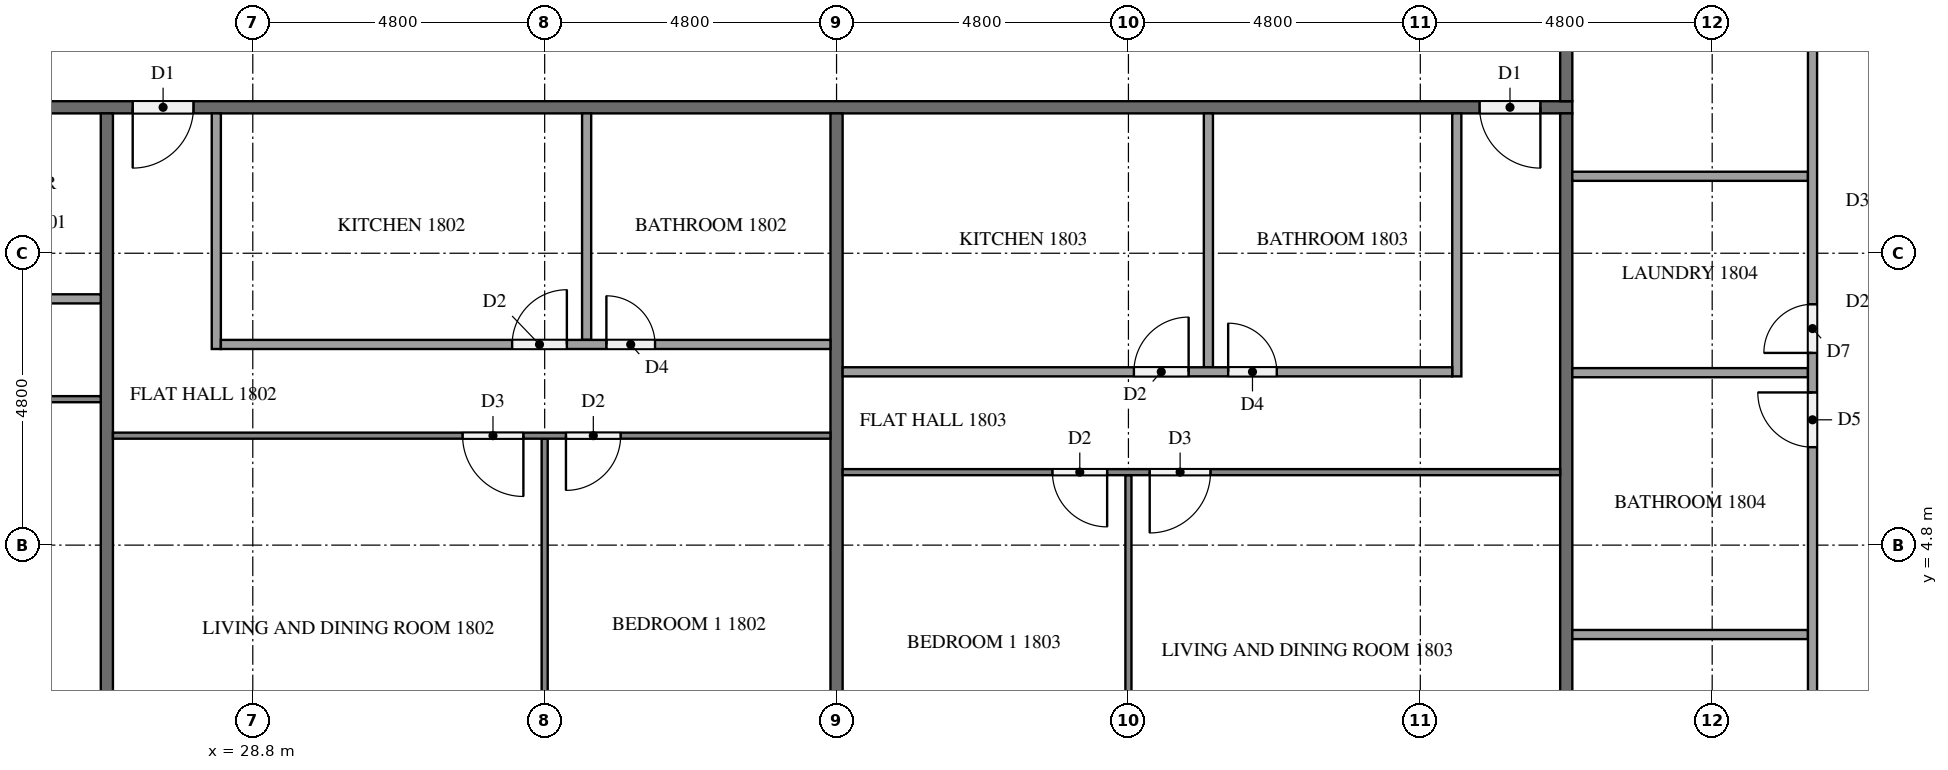
"""IFC4 building model, lengths in metres.
Left out: names, types, materials, properties, quantities, classifications, styles, units other than length and angle.
Written with IfcOpenShell. Run it as: python <this file> out.ifc"""

import sys

from ifc_helpers import new_model, si_unit, direction, frame, frame_2d, origin, place, context, subcontext, project, spatial, rectangle, extrude, element, fill, save


model = new_model("IFC4")
c1 = context("Model", 3, precision=1e-05, world=origin(), true_north=direction((0.0, 1.0)))
c2 = subcontext(c1, "Body", "Model", "MODEL_VIEW")
j1 = project(units=[si_unit("LENGTHUNIT", "METRE"), si_unit("PLANEANGLEUNIT", "RADIAN")], contexts=[c1])
p1 = place(None, origin())
s1 = spatial("IfcSite", under=j1, at=p1, CompositionType="ELEMENT")
p2 = place(p1, origin())
s2 = spatial("IfcBuilding", under=s1, at=p2, CompositionType="ELEMENT")
p3 = place(p2, frame((0.0, 0.0, 73.3)))
s3 = spatial("IfcBuildingStorey", under=s2, at=p3, CompositionType="ELEMENT", Elevation=73.3)
p4 = place(p3, frame((50.5, 12.0, 0.0), z_axis=(0.0, 0.0, 1.0), x_axis=(-1.0, 0.0, 0.0)))
e1 = element("IfcWall", 1, at=p4, inside=s3, PredefinedType="PARTITIONING", context=c2, shape_type="SweptSolid", body=[
    extrude(rectangle(XDim=38.6, YDim=0.2, at=frame_2d((19.3, 0.0))), origin(), (0.0, 0.0, 1.0), 3.2),
])
p5 = place(p4, frame((37.075, 0.0, 0.0)))
e2 = element("IfcOpeningElement", 2, at=p5, cuts=e1, PredefinedType="OPENING", context=c2, shape_type="SweptSolid", body=[
    extrude(rectangle(XDim=1.0, YDim=2.1, at=frame_2d((0.5, 1.05))), frame((0.0, 0.11, 0.0), z_axis=(0.0, -1.0, 0.0), x_axis=(1.0, 0.0, 0.0)), (0.0, 0.0, 1.0), 0.22),
])
p6 = place(p4, frame((22.675, 0.0, 0.0)))
e3 = element("IfcOpeningElement", 3, at=p6, cuts=e1, PredefinedType="OPENING", context=c2, shape_type="SweptSolid", body=[
    extrude(rectangle(XDim=1.0, YDim=2.1, at=frame_2d((0.5, 1.05))), frame((0.0, 0.11, 0.0), z_axis=(0.0, -1.0, 0.0), x_axis=(1.0, 0.0, 0.0)), (0.0, 0.0, 1.0), 0.22),
])
p7 = place(p4, frame((0.525, 0.0, 0.0)))
e4 = element("IfcOpeningElement", 4, at=p7, cuts=e1, PredefinedType="OPENING", context=c2, shape_type="SweptSolid", body=[
    extrude(rectangle(XDim=1.0, YDim=2.1, at=frame_2d((0.5, 1.05))), frame((0.0, 0.11, 0.0), z_axis=(0.0, -1.0, 0.0), x_axis=(1.0, 0.0, 0.0)), (0.0, 0.0, 1.0), 0.22),
])
p8 = place(p3, frame((50.4, 40.7, 0.0), z_axis=(0.0, 0.0, 1.0), x_axis=(0.0, -1.0, 0.0)))
e5 = element("IfcWall", 5, at=p8, inside=s3, PredefinedType="PARTITIONING", context=c2, shape_type="SweptSolid", body=[
    extrude(rectangle(XDim=28.6, YDim=0.2, at=frame_2d((14.3, 0.0))), origin(), (0.0, 0.0, 1.0), 3.2),
])
p9 = place(p8, frame((21.875, 0.0, 0.0)))
e6 = element("IfcOpeningElement", 6, at=p9, cuts=e5, PredefinedType="OPENING", context=c2, shape_type="SweptSolid", body=[
    extrude(rectangle(XDim=1.1, YDim=2.1, at=frame_2d((0.55, 1.05))), frame((0.0, 0.11, 0.0), z_axis=(0.0, -1.0, 0.0), x_axis=(1.0, 0.0, 0.0)), (0.0, 0.0, 1.0), 0.22),
])
p10 = place(p8, frame((20.075, 0.0, 0.0)))
e7 = element("IfcOpeningElement", 7, at=p10, cuts=e5, PredefinedType="OPENING", context=c2, shape_type="SweptSolid", body=[
    extrude(rectangle(XDim=1.0, YDim=2.1, at=frame_2d((0.5, 1.05))), frame((0.0, 0.11, 0.0), z_axis=(0.0, -1.0, 0.0), x_axis=(1.0, 0.0, 0.0)), (0.0, 0.0, 1.0), 0.22),
])
p11 = place(p8, frame((5.675, 0.0, 0.0)))
e8 = element("IfcOpeningElement", 8, at=p11, cuts=e5, PredefinedType="OPENING", context=c2, shape_type="SweptSolid", body=[
    extrude(rectangle(XDim=1.0, YDim=2.1, at=frame_2d((0.5, 1.05))), frame((0.0, 0.11, 0.0), z_axis=(0.0, -1.0, 0.0), x_axis=(1.0, 0.0, 0.0)), (0.0, 0.0, 1.0), 0.22),
])
p12 = place(p3, frame((26.4, 11.9, 0.0), z_axis=(0.0, 0.0, 1.0), x_axis=(0.0, -1.0, 0.0)))
e9 = element("IfcWall", 9, at=p12, inside=s3, PredefinedType="PARTITIONING", context=c2, shape_type="SweptSolid", body=[
    extrude(rectangle(XDim=11.8, YDim=0.2, at=frame_2d((5.9, 0.0))), origin(), (0.0, 0.0, 1.0), 3.2),
])
p13 = place(p3, frame((38.4, 11.9, 0.0), z_axis=(0.0, 0.0, 1.0), x_axis=(0.0, -1.0, 0.0)))
e10 = element("IfcWall", 10, at=p13, inside=s3, PredefinedType="PARTITIONING", context=c2, shape_type="SweptSolid", body=[
    extrude(rectangle(XDim=11.475, YDim=0.2, at=frame_2d((5.737, 0.0))), origin(), (0.0, 0.0, 1.0), 3.2),
])
p14 = place(p3, frame((50.4, 11.9, 0.0), z_axis=(0.0, 0.0, 1.0), x_axis=(0.0, -1.0, 0.0)))
e11 = element("IfcWall", 11, at=p14, inside=s3, PredefinedType="PARTITIONING", context=c2, shape_type="SweptSolid", body=[
    extrude(rectangle(XDim=11.8, YDim=0.2, at=frame_2d((5.9, 0.0))), origin(), (0.0, 0.0, 1.0), 3.2),
])
p15 = place(p3, frame((26.3, 7.2, 0.0), z_axis=(0.0, 0.0, 1.0), x_axis=(-1.0, 0.0, 0.0)))
e12 = element("IfcWall", 12, at=p15, inside=s3, PredefinedType="PARTITIONING", context=c2, shape_type="SweptSolid", body=[
    extrude(rectangle(XDim=14.2, YDim=0.1, at=frame_2d((7.1, 0.0))), origin(), (0.0, 0.0, 1.0), 3.2),
])
p16 = place(p15, frame((12.9, 0.0, 0.0)))
e13 = element("IfcOpeningElement", 13, at=p16, cuts=e12, PredefinedType="OPENING", context=c2, shape_type="SweptSolid", body=[
    extrude(rectangle(XDim=1.0, YDim=2.1, at=frame_2d((0.5, 1.05))), frame((0.0, 0.06, 0.0), z_axis=(0.0, -1.0, 0.0), x_axis=(1.0, 0.0, 0.0)), (0.0, 0.0, 1.0), 0.12),
])
p17 = place(p15, frame((5.05, 0.0, 0.0)))
e14 = element("IfcOpeningElement", 14, at=p17, cuts=e12, PredefinedType="OPENING", context=c2, shape_type="SweptSolid", body=[
    extrude(rectangle(XDim=0.9, YDim=2.1, at=frame_2d((0.45, 1.05))), frame((0.0, 0.06, 0.0), z_axis=(0.0, -1.0, 0.0), x_axis=(1.0, 0.0, 0.0)), (0.0, 0.0, 1.0), 0.12),
])
p18 = place(p15, frame((3.45, 0.0, 0.0)))
e15 = element("IfcOpeningElement", 15, at=p18, cuts=e12, PredefinedType="OPENING", context=c2, shape_type="SweptSolid", body=[
    extrude(rectangle(XDim=0.9, YDim=2.1, at=frame_2d((0.45, 1.05))), frame((0.0, 0.06, 0.0), z_axis=(0.0, -1.0, 0.0), x_axis=(1.0, 0.0, 0.0)), (0.0, 0.0, 1.0), 0.12),
])
p19 = place(p3, frame((13.875, 8.85, 0.0), z_axis=(0.0, 0.0, 1.0), x_axis=(1.0, 0.0, 0.0)))
e16 = element("IfcWall", 16, at=p19, inside=s3, PredefinedType="PARTITIONING", context=c2, shape_type="SweptSolid", body=[
    extrude(rectangle(XDim=12.425, YDim=0.15, at=frame_2d((6.212, 0.0))), origin(), (0.0, 0.0, 1.0), 3.2),
])
p20 = place(p19, frame((0.3, 0.0, 0.0)))
e17 = element("IfcOpeningElement", 17, at=p20, cuts=e16, PredefinedType="OPENING", context=c2, shape_type="SweptSolid", body=[
    extrude(rectangle(XDim=0.9, YDim=2.1, at=frame_2d((0.45, 1.05))), frame((0.0, 0.085, 0.0), z_axis=(0.0, -1.0, 0.0), x_axis=(1.0, 0.0, 0.0)), (0.0, 0.0, 1.0), 0.17),
])
p21 = place(p19, frame((8.333, 0.0, 0.0)))
e18 = element("IfcOpeningElement", 18, at=p21, cuts=e16, PredefinedType="OPENING", context=c2, shape_type="SweptSolid", body=[
    extrude(rectangle(XDim=0.9, YDim=2.1, at=frame_2d((0.45, 1.05))), frame((0.0, 0.085, 0.0), z_axis=(0.0, -1.0, 0.0), x_axis=(1.0, 0.0, 0.0)), (0.0, 0.0, 1.0), 0.17),
])
p22 = place(p19, frame((9.883, 0.0, 0.0)))
e19 = element("IfcOpeningElement", 19, at=p22, cuts=e16, PredefinedType="OPENING", context=c2, shape_type="SweptSolid", body=[
    extrude(rectangle(XDim=0.8, YDim=2.1, at=frame_2d((0.4, 1.05))), frame((0.0, 0.085, 0.0), z_axis=(0.0, -1.0, 0.0), x_axis=(1.0, 0.0, 0.0)), (0.0, 0.0, 1.0), 0.17),
])
p23 = place(p3, frame((33.6, 6.55, 0.0), z_axis=(0.0, 0.0, 1.0), x_axis=(0.0, -1.0, 0.0)))
e20 = element("IfcWall", 20, at=p23, inside=s3, PredefinedType="PARTITIONING", context=c2, shape_type="SweptSolid", body=[
    extrude(rectangle(XDim=6.45, YDim=0.1, at=frame_2d((3.225, 0.0))), origin(), (0.0, 0.0, 1.0), 3.2),
])
p24 = place(p3, frame((38.3, 6.6, 0.0), z_axis=(0.0, 0.0, 1.0), x_axis=(-1.0, 0.0, 0.0)))
e21 = element("IfcWall", 21, at=p24, inside=s3, PredefinedType="PARTITIONING", context=c2, shape_type="SweptSolid", body=[
    extrude(rectangle(XDim=11.8, YDim=0.1, at=frame_2d((5.9, 0.0))), origin(), (0.0, 0.0, 1.0), 3.2),
])
p25 = place(p24, frame((5.05, 0.0, 0.0)))
e22 = element("IfcOpeningElement", 22, at=p25, cuts=e21, PredefinedType="OPENING", context=c2, shape_type="SweptSolid", body=[
    extrude(rectangle(XDim=1.0, YDim=2.1, at=frame_2d((0.5, 1.05))), frame((0.0, 0.06, 0.0), z_axis=(0.0, -1.0, 0.0), x_axis=(1.0, 0.0, 0.0)), (0.0, 0.0, 1.0), 0.12),
])
p26 = place(p24, frame((3.45, 0.0, 0.0)))
e23 = element("IfcOpeningElement", 23, at=p26, cuts=e21, PredefinedType="OPENING", context=c2, shape_type="SweptSolid", body=[
    extrude(rectangle(XDim=0.9, YDim=2.1, at=frame_2d((0.45, 1.05))), frame((0.0, 0.06, 0.0), z_axis=(0.0, -1.0, 0.0), x_axis=(1.0, 0.0, 0.0)), (0.0, 0.0, 1.0), 0.12),
])
p27 = place(p3, frame((34.29, 11.9, 0.0), z_axis=(0.0, 0.0, 1.0), x_axis=(0.0, -1.0, 0.0)))
e24 = element("IfcWall", 24, at=p27, inside=s3, PredefinedType="PARTITIONING", context=c2, shape_type="SweptSolid", body=[
    extrude(rectangle(XDim=3.725, YDim=0.15, at=frame_2d((1.862, 0.0))), origin(), (0.0, 0.0, 1.0), 3.2),
])
p28 = place(p3, frame((28.2, 11.9, 0.0), z_axis=(0.0, 0.0, 1.0), x_axis=(0.0, -1.0, 0.0)))
e25 = element("IfcWall", 25, at=p28, inside=s3, PredefinedType="PARTITIONING", context=c2, shape_type="SweptSolid", body=[
    extrude(rectangle(XDim=3.875, YDim=0.15, at=frame_2d((1.938, 0.0))), origin(), (0.0, 0.0, 1.0), 3.2),
])
p29 = place(p3, frame((28.275, 8.1, 0.0), z_axis=(0.0, 0.0, 1.0), x_axis=(1.0, 0.0, 0.0)))
e26 = element("IfcWall", 26, at=p29, inside=s3, PredefinedType="PARTITIONING", context=c2, shape_type="SweptSolid", body=[
    extrude(rectangle(XDim=10.025, YDim=0.15, at=frame_2d((5.013, 0.0))), origin(), (0.0, 0.0, 1.0), 3.2),
])
p30 = place(p29, frame((4.79, 0.0, 0.0)))
e27 = element("IfcOpeningElement", 27, at=p30, cuts=e26, PredefinedType="OPENING", context=c2, shape_type="SweptSolid", body=[
    extrude(rectangle(XDim=0.9, YDim=2.1, at=frame_2d((0.45, 1.05))), frame((0.0, 0.085, 0.0), z_axis=(0.0, -1.0, 0.0), x_axis=(1.0, 0.0, 0.0)), (0.0, 0.0, 1.0), 0.17),
])
p31 = place(p29, frame((6.34, 0.0, 0.0)))
e28 = element("IfcOpeningElement", 28, at=p31, cuts=e26, PredefinedType="OPENING", context=c2, shape_type="SweptSolid", body=[
    extrude(rectangle(XDim=0.8, YDim=2.1, at=frame_2d((0.4, 1.05))), frame((0.0, 0.085, 0.0), z_axis=(0.0, -1.0, 0.0), x_axis=(1.0, 0.0, 0.0)), (0.0, 0.0, 1.0), 0.17),
])
p32 = place(p3, frame((43.2, 5.95, 0.0), z_axis=(0.0, 0.0, 1.0), x_axis=(0.0, -1.0, 0.0)))
e29 = element("IfcWall", 29, at=p32, inside=s3, PredefinedType="PARTITIONING", context=c2, shape_type="SweptSolid", body=[
    extrude(rectangle(XDim=5.85, YDim=0.1, at=frame_2d((2.925, 0.0))), origin(), (0.0, 0.0, 1.0), 3.2),
])
p33 = place(p3, frame((50.3, 6.0, 0.0), z_axis=(0.0, 0.0, 1.0), x_axis=(-1.0, 0.0, 0.0)))
e30 = element("IfcWall", 30, at=p33, inside=s3, PredefinedType="PARTITIONING", context=c2, shape_type="SweptSolid", body=[
    extrude(rectangle(XDim=11.8, YDim=0.1, at=frame_2d((5.9, 0.0))), origin(), (0.0, 0.0, 1.0), 3.2),
])
p34 = place(p33, frame((5.75, 0.0, 0.0)))
e31 = element("IfcOpeningElement", 31, at=p34, cuts=e30, PredefinedType="OPENING", context=c2, shape_type="SweptSolid", body=[
    extrude(rectangle(XDim=1.0, YDim=2.1, at=frame_2d((0.5, 1.05))), frame((0.0, 0.06, 0.0), z_axis=(0.0, -1.0, 0.0), x_axis=(1.0, 0.0, 0.0)), (0.0, 0.0, 1.0), 0.12),
])
p35 = place(p33, frame((7.45, 0.0, 0.0)))
e32 = element("IfcOpeningElement", 32, at=p35, cuts=e30, PredefinedType="OPENING", context=c2, shape_type="SweptSolid", body=[
    extrude(rectangle(XDim=0.9, YDim=2.1, at=frame_2d((0.45, 1.05))), frame((0.0, 0.06, 0.0), z_axis=(0.0, -1.0, 0.0), x_axis=(1.0, 0.0, 0.0)), (0.0, 0.0, 1.0), 0.12),
])
p36 = place(p3, frame((44.515, 11.9, 0.0), z_axis=(0.0, 0.0, 1.0), x_axis=(0.0, -1.0, 0.0)))
e33 = element("IfcWall", 33, at=p36, inside=s3, PredefinedType="PARTITIONING", context=c2, shape_type="SweptSolid", body=[
    extrude(rectangle(XDim=4.175, YDim=0.15, at=frame_2d((2.087, 0.0))), origin(), (0.0, 0.0, 1.0), 3.2),
])
p37 = place(p3, frame((48.6, 11.9, 0.0), z_axis=(0.0, 0.0, 1.0), x_axis=(0.0, -1.0, 0.0)))
e34 = element("IfcWall", 34, at=p37, inside=s3, PredefinedType="PARTITIONING", context=c2, shape_type="SweptSolid", body=[
    extrude(rectangle(XDim=4.325, YDim=0.15, at=frame_2d((2.163, 0.0))), origin(), (0.0, 0.0, 1.0), 3.2),
])
p38 = place(p3, frame((38.5, 7.65, 0.0), z_axis=(0.0, 0.0, 1.0), x_axis=(1.0, 0.0, 0.0)))
e35 = element("IfcWall", 35, at=p38, inside=s3, PredefinedType="PARTITIONING", context=c2, shape_type="SweptSolid", body=[
    extrude(rectangle(XDim=10.025, YDim=0.15, at=frame_2d((5.012, 0.0))), origin(), (0.0, 0.0, 1.0), 3.2),
])
p39 = place(p38, frame((6.34, 0.0, 0.0)))
e36 = element("IfcOpeningElement", 36, at=p39, cuts=e35, PredefinedType="OPENING", context=c2, shape_type="SweptSolid", body=[
    extrude(rectangle(XDim=0.8, YDim=2.1, at=frame_2d((0.4, 1.05))), frame((0.0, 0.085, 0.0), z_axis=(0.0, -1.0, 0.0), x_axis=(1.0, 0.0, 0.0)), (0.0, 0.0, 1.0), 0.17),
])
p40 = place(p38, frame((4.79, 0.0, 0.0)))
e37 = element("IfcOpeningElement", 37, at=p40, cuts=e35, PredefinedType="OPENING", context=c2, shape_type="SweptSolid", body=[
    extrude(rectangle(XDim=0.9, YDim=2.1, at=frame_2d((0.45, 1.05))), frame((0.0, 0.085, 0.0), z_axis=(0.0, -1.0, 0.0), x_axis=(1.0, 0.0, 0.0)), (0.0, 0.0, 1.0), 0.17),
])
for number, where, z_axis, x_axis in (
    (38, (50.5, 10.865, 0.0), (0.0, 0.0, 1.0), (1.0, 0.0, 0.0)),
    (39, (50.5, 7.636, 0.0), (0.0, 0.0, 1.0), (1.0, 0.0, 0.0)),
    (40, (50.5, 3.33, 0.0), (0.0, 0.0, 1.0), (1.0, 0.0, 0.0)),
):
    element("IfcWall", number, at=place(p3, frame(where, z_axis=z_axis, x_axis=x_axis)), inside=s3, PredefinedType="PARTITIONING", context=c2, shape_type="SweptSolid", body=[
        extrude(rectangle(XDim=3.875, YDim=0.15, at=frame_2d((1.938, 0.0))), origin(), (0.0, 0.0, 1.0), 3.2),
    ])
p41 = place(p3, frame((54.45, 0.1, 0.0), z_axis=(0.0, 0.0, 1.0), x_axis=(0.0, 1.0, 0.0)))
e41 = element("IfcWall", 41, at=p41, inside=s3, PredefinedType="PARTITIONING", context=c2, shape_type="SweptSolid", body=[
    extrude(rectangle(XDim=17.225, YDim=0.15, at=frame_2d((8.612, 0.0))), origin(), (0.0, 0.0, 1.0), 3.2),
])
p42 = place(p41, frame((16.025, 0.0, 0.0)))
e42 = element("IfcOpeningElement", 42, at=p42, cuts=e41, PredefinedType="OPENING", context=c2, shape_type="SweptSolid", body=[
    extrude(rectangle(XDim=0.9, YDim=2.1, at=frame_2d((0.45, 1.05))), frame((0.0, 0.085, 0.0), z_axis=(0.0, -1.0, 0.0), x_axis=(1.0, 0.0, 0.0)), (0.0, 0.0, 1.0), 0.17),
])
p43 = place(p41, frame((7.861, 0.0, 0.0)))
e43 = element("IfcOpeningElement", 43, at=p43, cuts=e41, PredefinedType="OPENING", context=c2, shape_type="SweptSolid", body=[
    extrude(rectangle(XDim=0.8, YDim=2.1, at=frame_2d((0.4, 1.05))), frame((0.0, 0.085, 0.0), z_axis=(0.0, -1.0, 0.0), x_axis=(1.0, 0.0, 0.0)), (0.0, 0.0, 1.0), 0.17),
])
p44 = place(p41, frame((6.311, 0.0, 0.0)))
e44 = element("IfcOpeningElement", 44, at=p44, cuts=e41, PredefinedType="OPENING", context=c2, shape_type="SweptSolid", body=[
    extrude(rectangle(XDim=0.9, YDim=2.1, at=frame_2d((0.45, 1.05))), frame((0.0, 0.085, 0.0), z_axis=(0.0, -1.0, 0.0), x_axis=(1.0, 0.0, 0.0)), (0.0, 0.0, 1.0), 0.17),
])
p45 = place(p41, frame((0.35, 0.0, 0.0)))
e45 = element("IfcOpeningElement", 45, at=p45, cuts=e41, PredefinedType="OPENING", context=c2, shape_type="SweptSolid", body=[
    extrude(rectangle(XDim=0.8, YDim=2.1, at=frame_2d((0.4, 1.05))), frame((0.0, 0.085, 0.0), z_axis=(0.0, -1.0, 0.0), x_axis=(1.0, 0.0, 0.0)), (0.0, 0.0, 1.0), 0.17),
])
p46 = place(p6, origin())
e46 = element("IfcDoor", 46, at=p46, inside=s3, OperationType="SINGLE_SWING_RIGHT", PredefinedType="DOOR", context=c2, shape_type="SweptSolid", body=[
    extrude(rectangle(XDim=1.0, YDim=2.1, at=frame_2d((0.5, 1.05))), frame((0.0, 0.025, 0.0), z_axis=(0.0, -1.0, 0.0), x_axis=(1.0, 0.0, 0.0)), (0.0, 0.0, 1.0), 0.05),
])
fill(e3, e46)
p47 = place(p7, origin())
e47 = element("IfcDoor", 47, at=p47, inside=s3, OperationType="SINGLE_SWING_LEFT", PredefinedType="DOOR", context=c2, shape_type="SweptSolid", body=[
    extrude(rectangle(XDim=1.0, YDim=2.1, at=frame_2d((0.5, 1.05))), frame((0.0, 0.025, 0.0), z_axis=(0.0, -1.0, 0.0), x_axis=(1.0, 0.0, 0.0)), (0.0, 0.0, 1.0), 0.05),
])
fill(e4, e47)
p48 = place(p25, origin())
e48 = element("IfcDoor", 48, at=p48, inside=s3, OperationType="SINGLE_SWING_LEFT", PredefinedType="DOOR", context=c2, shape_type="SweptSolid", body=[
    extrude(rectangle(XDim=1.0, YDim=2.1, at=frame_2d((0.5, 1.05))), frame((0.0, 0.025, 0.0), z_axis=(0.0, -1.0, 0.0), x_axis=(1.0, 0.0, 0.0)), (0.0, 0.0, 1.0), 0.05),
])
fill(e22, e48)
p49 = place(p26, origin())
e49 = element("IfcDoor", 49, at=p49, inside=s3, OperationType="SINGLE_SWING_RIGHT", PredefinedType="DOOR", context=c2, shape_type="SweptSolid", body=[
    extrude(rectangle(XDim=0.9, YDim=2.1, at=frame_2d((0.45, 1.05))), frame((0.0, 0.025, 0.0), z_axis=(0.0, -1.0, 0.0), x_axis=(1.0, 0.0, 0.0)), (0.0, 0.0, 1.0), 0.05),
])
fill(e23, e49)
p50 = place(p30, origin())
e50 = element("IfcDoor", 50, at=p50, inside=s3, OperationType="SINGLE_SWING_RIGHT", PredefinedType="DOOR", context=c2, shape_type="SweptSolid", body=[
    extrude(rectangle(XDim=0.9, YDim=2.1, at=frame_2d((0.45, 1.05))), frame((0.0, 0.025, 0.0), z_axis=(0.0, -1.0, 0.0), x_axis=(1.0, 0.0, 0.0)), (0.0, 0.0, 1.0), 0.05),
])
fill(e27, e50)
p51 = place(p31, origin())
e51 = element("IfcDoor", 51, at=p51, inside=s3, OperationType="SINGLE_SWING_LEFT", PredefinedType="DOOR", context=c2, shape_type="SweptSolid", body=[
    extrude(rectangle(XDim=0.8, YDim=2.1, at=frame_2d((0.4, 1.05))), frame((0.0, 0.025, 0.0), z_axis=(0.0, -1.0, 0.0), x_axis=(1.0, 0.0, 0.0)), (0.0, 0.0, 1.0), 0.05),
])
fill(e28, e51)
p52 = place(p34, origin())
e52 = element("IfcDoor", 52, at=p52, inside=s3, OperationType="SINGLE_SWING_RIGHT", PredefinedType="DOOR", context=c2, shape_type="SweptSolid", body=[
    extrude(rectangle(XDim=1.0, YDim=2.1, at=frame_2d((0.5, 1.05))), frame((0.0, 0.025, 0.0), z_axis=(0.0, -1.0, 0.0), x_axis=(1.0, 0.0, 0.0)), (0.0, 0.0, 1.0), 0.05),
])
fill(e31, e52)
p53 = place(p35, origin())
e53 = element("IfcDoor", 53, at=p53, inside=s3, OperationType="SINGLE_SWING_LEFT", PredefinedType="DOOR", context=c2, shape_type="SweptSolid", body=[
    extrude(rectangle(XDim=0.9, YDim=2.1, at=frame_2d((0.45, 1.05))), frame((0.0, 0.025, 0.0), z_axis=(0.0, -1.0, 0.0), x_axis=(1.0, 0.0, 0.0)), (0.0, 0.0, 1.0), 0.05),
])
fill(e32, e53)
p54 = place(p39, origin())
e54 = element("IfcDoor", 54, at=p54, inside=s3, OperationType="SINGLE_SWING_LEFT", PredefinedType="DOOR", context=c2, shape_type="SweptSolid", body=[
    extrude(rectangle(XDim=0.8, YDim=2.1, at=frame_2d((0.4, 1.05))), frame((0.0, 0.025, 0.0), z_axis=(0.0, -1.0, 0.0), x_axis=(1.0, 0.0, 0.0)), (0.0, 0.0, 1.0), 0.05),
])
fill(e36, e54)
p55 = place(p40, origin())
e55 = element("IfcDoor", 55, at=p55, inside=s3, OperationType="SINGLE_SWING_RIGHT", PredefinedType="DOOR", context=c2, shape_type="SweptSolid", body=[
    extrude(rectangle(XDim=0.9, YDim=2.1, at=frame_2d((0.45, 1.05))), frame((0.0, 0.025, 0.0), z_axis=(0.0, -1.0, 0.0), x_axis=(1.0, 0.0, 0.0)), (0.0, 0.0, 1.0), 0.05),
])
fill(e37, e55)
p56 = place(p43, origin())
e56 = element("IfcDoor", 56, at=p56, inside=s3, OperationType="SINGLE_SWING_LEFT", PredefinedType="DOOR", context=c2, shape_type="SweptSolid", body=[
    extrude(rectangle(XDim=0.8, YDim=2.1, at=frame_2d((0.4, 1.05))), frame((0.0, 0.025, 0.0), z_axis=(0.0, -1.0, 0.0), x_axis=(1.0, 0.0, 0.0)), (0.0, 0.0, 1.0), 0.05),
])
fill(e43, e56)
p57 = place(p44, origin())
e57 = element("IfcDoor", 57, at=p57, inside=s3, OperationType="SINGLE_SWING_RIGHT", PredefinedType="DOOR", context=c2, shape_type="SweptSolid", body=[
    extrude(rectangle(XDim=0.9, YDim=2.1, at=frame_2d((0.45, 1.05))), frame((0.0, 0.025, 0.0), z_axis=(0.0, -1.0, 0.0), x_axis=(1.0, 0.0, 0.0)), (0.0, 0.0, 1.0), 0.05),
])
fill(e44, e57)
save(model, sys.argv[1])
